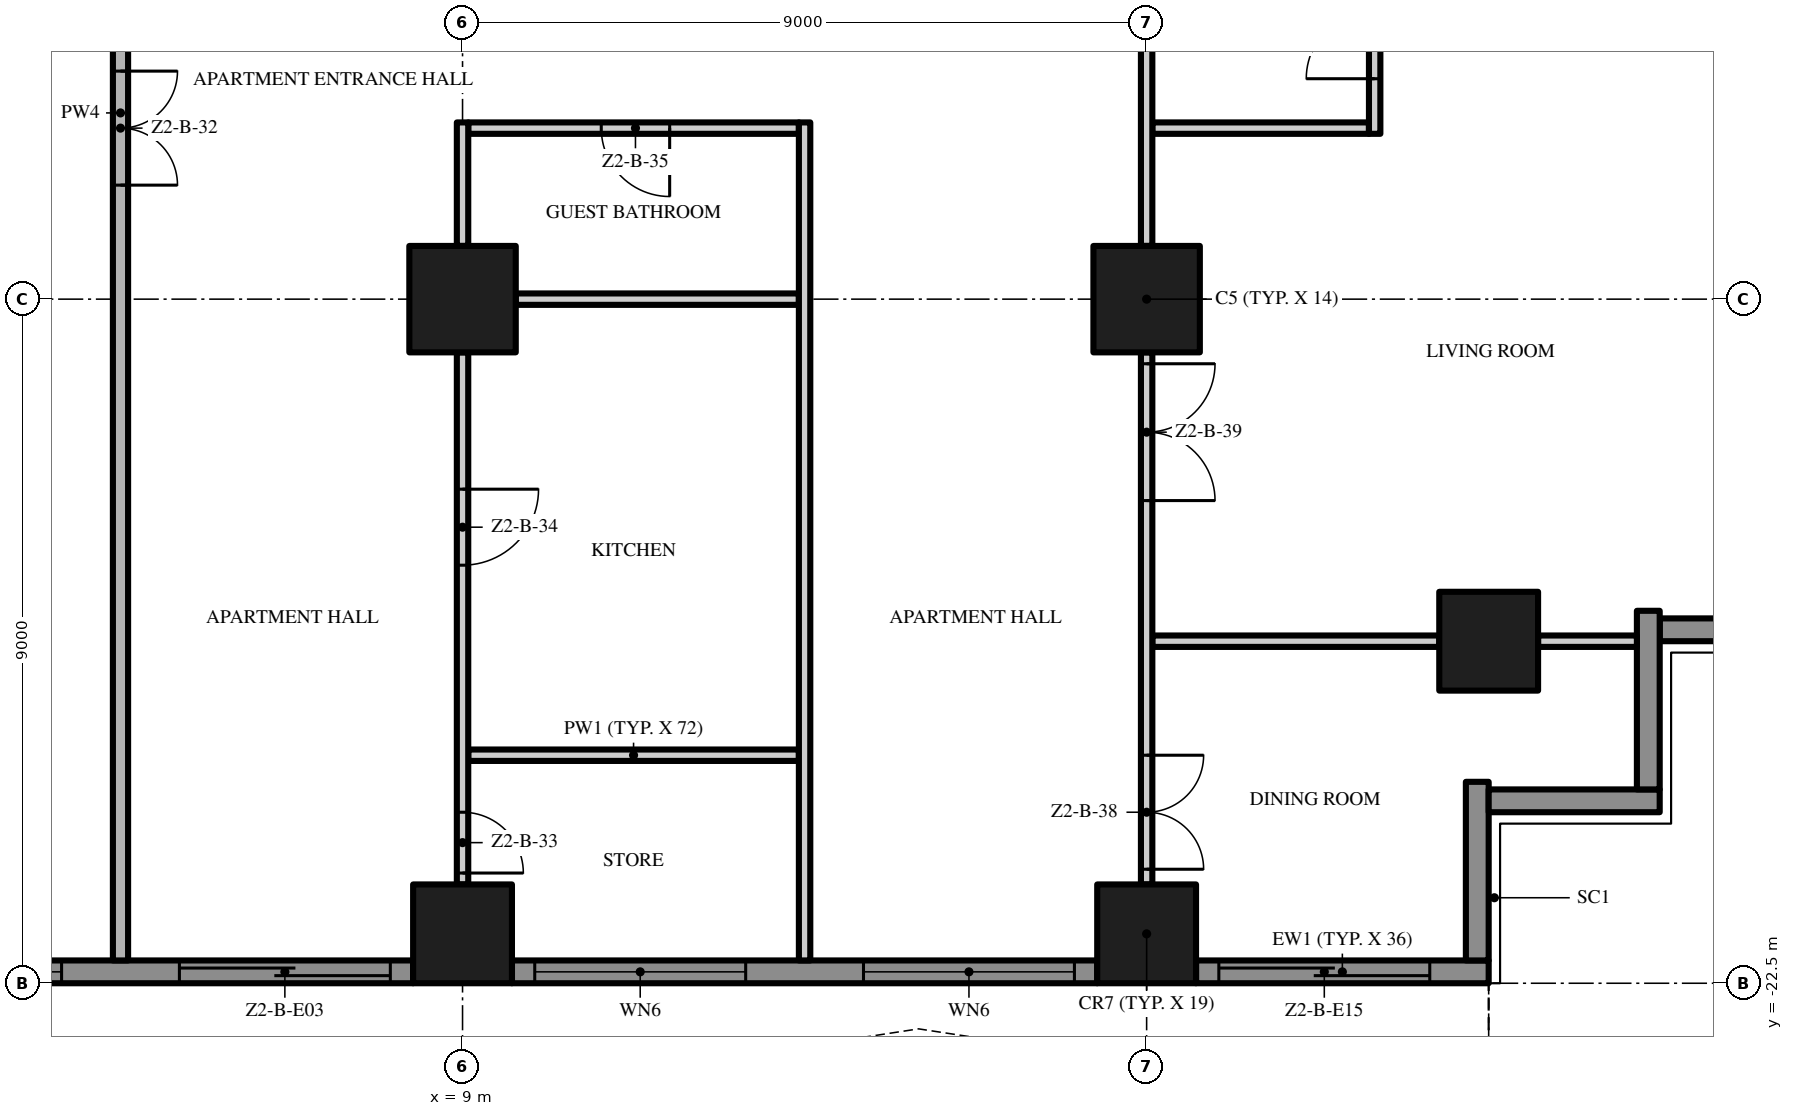
"""IFC4 building model, lengths in metres.
Left out: names, types, materials, properties, quantities, classifications, styles, units other than length and angle.
Written with IfcOpenShell. Run it as: python <this file> out.ifc"""

import sys

from ifc_helpers import new_model, si_unit, direction, frame, frame_2d, origin, origin_2d, place, context, subcontext, project, spatial, polyline, rectangle, outline, extrude, element, fill, save


model = new_model("IFC4")
c1 = context("Model", 3, precision=1e-05, world=origin(), true_north=direction((0.0, 1.0)))
c2 = subcontext(c1, "Body", "Model", "MODEL_VIEW")
j1 = project(units=[si_unit("LENGTHUNIT", "METRE"), si_unit("PLANEANGLEUNIT", "RADIAN")], contexts=[c1])
p1 = place(None, origin())
s1 = spatial("IfcSite", under=j1, at=p1, CompositionType="ELEMENT")
p2 = place(p1, origin())
s2 = spatial("IfcBuilding", under=s1, at=p2, CompositionType="ELEMENT")
p3 = place(p2, frame((0.0, 0.0, 84.6)))
s3 = spatial("IfcBuildingStorey", under=s2, at=p3, CompositionType="ELEMENT", Elevation=84.6)
p4 = place(p3, frame((18.0, -13.5, 0.0), z_axis=(0.0, 0.0, 1.0), x_axis=(1.0, 0.0, 0.0)))
e1 = element("IfcColumn", 1, at=p4, inside=s3, PredefinedType="COLUMN", context=c2, shape_type="SweptSolid", body=[
    extrude(rectangle(XDim=1.4, YDim=1.4, at=origin_2d()), origin(), (0.0, 0.0, 1.0), 3.5),
])
for number, where, z_axis, x_axis in (
    (2, (18.0, -21.85, 0.0), (0.0, 0.0, 1.0), (1.0, 0.0, 0.0)),
    (3, (22.5, -18.0, 0.0), (0.0, 0.0, 1.0), (1.0, 0.0, 0.0)),
):
    element("IfcColumn", number, at=place(p3, frame(where, z_axis=z_axis, x_axis=x_axis)), inside=s3, PredefinedType="COLUMN", context=c2, shape_type="SweptSolid", body=[
        extrude(rectangle(XDim=1.3, YDim=1.3, at=origin_2d()), origin(), (0.0, 0.0, 1.0), 3.5),
    ])
p5 = place(p3, frame((9.0, -13.5, 0.0), z_axis=(0.0, 0.0, 1.0), x_axis=(1.0, 0.0, 0.0)))
e4 = element("IfcColumn", 4, at=p5, inside=s3, PredefinedType="COLUMN", context=c2, shape_type="SweptSolid", body=[
    extrude(rectangle(XDim=1.4, YDim=1.4, at=origin_2d()), origin(), (0.0, 0.0, 1.0), 3.5),
])
p6 = place(p3, frame((9.0, -21.85, 0.0), z_axis=(0.0, 0.0, 1.0), x_axis=(1.0, 0.0, 0.0)))
e5 = element("IfcColumn", 5, at=p6, inside=s3, PredefinedType="COLUMN", context=c2, shape_type="SweptSolid", body=[
    extrude(rectangle(XDim=1.3, YDim=1.3, at=origin_2d()), origin(), (0.0, 0.0, 1.0), 3.5),
])
p7 = place(p3, frame((8.35, -22.35, 0.0), z_axis=(0.0, 0.0, 1.0), x_axis=(-1.0, 0.0, 0.0)))
e6 = element("IfcWall", 6, at=p7, inside=s3, PredefinedType="SOLIDWALL", context=c2, shape_type="SweptSolid", body=[
    extrude(rectangle(XDim=7.7, YDim=0.3, at=frame_2d((3.85, 0.0))), origin(), (0.0, 0.0, 1.0), 3.5),
])
p8 = place(p7, frame((4.625, 0.0, 0.45)))
e7 = element("IfcOpeningElement", 7, at=p8, cuts=e6, PredefinedType="OPENING", context=c2, shape_type="SweptSolid", body=[
    extrude(rectangle(XDim=2.775, YDim=2.65, at=frame_2d((1.387, 1.325))), frame((0.0, 0.16, 0.0), z_axis=(0.0, -1.0, 0.0), x_axis=(1.0, 0.0, 0.0)), (0.0, 0.0, 1.0), 0.32),
])
p9 = place(p7, frame((0.3, 0.0, 0.0)))
e8 = element("IfcOpeningElement", 8, at=p9, cuts=e6, PredefinedType="OPENING", context=c2, shape_type="SweptSolid", body=[
    extrude(rectangle(XDim=2.775, YDim=2.4, at=frame_2d((1.387, 1.2))), frame((0.0, 0.16, 0.0), z_axis=(0.0, -1.0, 0.0), x_axis=(1.0, 0.0, 0.0)), (0.0, 0.0, 1.0), 0.32),
])
p10 = place(p3, frame((17.35, -22.35, 0.0), z_axis=(0.0, 0.0, 1.0), x_axis=(-1.0, 0.0, 0.0)))
e9 = element("IfcWall", 9, at=p10, inside=s3, PredefinedType="SOLIDWALL", context=c2, shape_type="SweptSolid", body=[
    extrude(rectangle(XDim=7.7, YDim=0.3, at=frame_2d((3.85, 0.0))), origin(), (0.0, 0.0, 1.0), 3.5),
])
p11 = place(p10, frame((4.625, 0.0, 0.45)))
e10 = element("IfcOpeningElement", 10, at=p11, cuts=e9, PredefinedType="OPENING", context=c2, shape_type="SweptSolid", body=[
    extrude(rectangle(XDim=2.775, YDim=2.65, at=frame_2d((1.387, 1.325))), frame((0.0, 0.16, 0.0), z_axis=(0.0, -1.0, 0.0), x_axis=(1.0, 0.0, 0.0)), (0.0, 0.0, 1.0), 0.32),
])
p12 = place(p10, frame((0.3, 0.0, 0.45)))
e11 = element("IfcOpeningElement", 11, at=p12, cuts=e9, PredefinedType="OPENING", context=c2, shape_type="SweptSolid", body=[
    extrude(rectangle(XDim=2.775, YDim=2.65, at=frame_2d((1.387, 1.325))), frame((0.0, 0.16, 0.0), z_axis=(0.0, -1.0, 0.0), x_axis=(1.0, 0.0, 0.0)), (0.0, 0.0, 1.0), 0.32),
])
p13 = place(p3, frame((22.5, -22.35, 0.0), z_axis=(0.0, 0.0, 1.0), x_axis=(-1.0, 0.0, 0.0)))
e12 = element("IfcWall", 12, at=p13, inside=s3, PredefinedType="SOLIDWALL", context=c2, shape_type="SweptSolid", body=[
    extrude(rectangle(XDim=3.85, YDim=0.3, at=frame_2d((1.925, 0.0))), origin(), (0.0, 0.0, 1.0), 3.5),
])
p14 = place(p13, frame((0.775, 0.0, 0.0)))
e13 = element("IfcOpeningElement", 13, at=p14, cuts=e12, PredefinedType="OPENING", context=c2, shape_type="SweptSolid", body=[
    extrude(rectangle(XDim=2.775, YDim=2.4, at=frame_2d((1.387, 1.2))), frame((0.0, 0.16, 0.0), z_axis=(0.0, -1.0, 0.0), x_axis=(1.0, 0.0, 0.0)), (0.0, 0.0, 1.0), 0.32),
])
p15 = place(p3, frame((22.35, -19.85, 0.0), z_axis=(0.0, 0.0, 1.0), x_axis=(0.0, -1.0, 0.0)))
e14 = element("IfcWall", 14, at=p15, inside=s3, PredefinedType="SOLIDWALL", context=c2, shape_type="SweptSolid", body=[
    extrude(rectangle(XDim=2.35, YDim=0.3, at=frame_2d((1.175, 0.0))), origin(), (0.0, 0.0, 1.0), 3.5),
])
p16 = place(p3, frame((24.75, -20.1, 0.0), z_axis=(0.0, 0.0, 1.0), x_axis=(-1.0, 0.0, 0.0)))
e15 = element("IfcWall", 15, at=p16, inside=s3, PredefinedType="SOLIDWALL", context=c2, shape_type="SweptSolid", body=[
    extrude(rectangle(XDim=2.25, YDim=0.3, at=frame_2d((1.125, 0.0))), origin(), (0.0, 0.0, 1.0), 3.5),
])
p17 = place(p3, frame((24.6, -17.6, 0.0), z_axis=(0.0, 0.0, 1.0), x_axis=(0.0, -1.0, 0.0)))
e16 = element("IfcWall", 16, at=p17, inside=s3, PredefinedType="SOLIDWALL", context=c2, shape_type="SweptSolid", body=[
    extrude(rectangle(XDim=2.35, YDim=0.3, at=frame_2d((1.175, 0.0))), origin(), (0.0, 0.0, 1.0), 3.5),
])
p18 = place(p3, frame((27.0, -17.85, 0.0), z_axis=(0.0, 0.0, 1.0), x_axis=(-1.0, 0.0, 0.0)))
e17 = element("IfcWall", 17, at=p18, inside=s3, PredefinedType="SOLIDWALL", context=c2, shape_type="SweptSolid", body=[
    extrude(rectangle(XDim=2.25, YDim=0.3, at=frame_2d((1.125, 0.0))), origin(), (0.0, 0.0, 1.0), 3.5),
])
p19 = place(p3, origin())
e18 = element("IfcWall", 18, at=p19, inside=s3, PredefinedType="USERDEFINED", context=c2, shape_type="SweptSolid", body=[
    extrude(outline(polyline([(-22.5, -25.5), (-21.0, -25.271), (-19.5, -24.671), (-18.0, -23.929), (-16.5, -23.329), (-15.0, -23.1), (-13.5, -23.329), (-12.0, -23.929), (-10.5, -24.671), (-9.0, -25.271), (-7.5, -25.5), (-6.0, -25.271), (-4.5, -24.671), (-3.0, -23.929), (-1.5, -23.329), (0.0, -23.1), (1.5, -23.329), (3.0, -23.929), (4.5, -24.671), (6.0, -25.271), (7.5, -25.5), (9.0, -25.271), (10.5, -24.671), (12.0, -23.929), (13.5, -23.329), (15.0, -23.1), (16.5, -23.329), (18.0, -23.929), (19.5, -24.671), (21.0, -25.271), (22.5, -25.5), (22.538, -25.253), (21.066, -25.028), (19.602, -24.442), (18.102, -23.701), (16.566, -23.086), (15.0, -22.847), (13.434, -23.086), (11.898, -23.701), (10.398, -24.442), (8.934, -25.028), (7.5, -25.247), (6.066, -25.028), (4.602, -24.442), (3.102, -23.701), (1.566, -23.086), (0.0, -22.847), (-1.566, -23.086), (-3.102, -23.701), (-4.602, -24.442), (-6.066, -25.028), (-7.5, -25.247), (-8.934, -25.028), (-10.398, -24.442), (-11.898, -23.701), (-13.434, -23.086), (-15.0, -22.847), (-16.566, -23.086), (-18.102, -23.701), (-19.602, -24.442), (-21.066, -25.028), (-22.538, -25.253), (-22.5, -25.5)])), origin(), (0.0, 0.0, 1.0), 0.9),
])
p20 = place(p3, frame((9.075, -19.5, 0.0), z_axis=(0.0, 0.0, 1.0), x_axis=(1.0, 0.0, 0.0)))
e19 = element("IfcWall", 19, at=p20, inside=s3, PredefinedType="PARTITIONING", context=c2, shape_type="SweptSolid", body=[
    extrude(rectangle(XDim=4.35, YDim=0.15, at=frame_2d((2.175, 0.0))), origin(), (0.0, 0.0, 1.0), 3.5),
])
p21 = place(p3, frame((18.075, -18.0, 0.0), z_axis=(0.0, 0.0, 1.0), x_axis=(1.0, 0.0, 0.0)))
e20 = element("IfcWall", 20, at=p21, inside=s3, PredefinedType="PARTITIONING", context=c2, shape_type="SweptSolid", body=[
    extrude(rectangle(XDim=3.775, YDim=0.15, at=frame_2d((1.887, 0.0))), origin(), (0.0, 0.0, 1.0), 3.5),
])
p22 = place(p3, frame((23.15, -18.0, 0.0), z_axis=(0.0, 0.0, 1.0), x_axis=(1.0, 0.0, 0.0)))
e21 = element("IfcWall", 21, at=p22, inside=s3, PredefinedType="PARTITIONING", context=c2, shape_type="SweptSolid", body=[
    extrude(rectangle(XDim=1.3, YDim=0.15, at=frame_2d((0.65, 0.0))), origin(), (0.0, 0.0, 1.0), 3.5),
])
p23 = place(p3, frame((9.7, -13.5, 0.0), z_axis=(0.0, 0.0, 1.0), x_axis=(1.0, 0.0, 0.0)))
e22 = element("IfcWall", 22, at=p23, inside=s3, PredefinedType="PARTITIONING", context=c2, shape_type="SweptSolid", body=[
    extrude(rectangle(XDim=3.725, YDim=0.15, at=frame_2d((1.863, 0.0))), origin(), (0.0, 0.0, 1.0), 3.5),
])
p24 = place(p3, frame((13.425, -11.25, 0.0), z_axis=(0.0, 0.0, 1.0), x_axis=(-1.0, 0.0, 0.0)))
e23 = element("IfcWall", 23, at=p24, inside=s3, PredefinedType="PARTITIONING", context=c2, shape_type="SweptSolid", body=[
    extrude(rectangle(XDim=4.35, YDim=0.15, at=frame_2d((2.175, 0.0))), origin(), (0.0, 0.0, 1.0), 3.5),
])
p25 = place(p24, frame((1.7, 0.0, 0.0)))
e24 = element("IfcOpeningElement", 24, at=p25, cuts=e23, PredefinedType="OPENING", context=c2, shape_type="SweptSolid", body=[
    extrude(rectangle(XDim=0.9, YDim=2.1, at=frame_2d((0.45, 1.05))), frame((0.0, 0.085, 0.0), z_axis=(0.0, -1.0, 0.0), x_axis=(1.0, 0.0, 0.0)), (0.0, 0.0, 1.0), 0.17),
])
p26 = place(p3, frame((18.075, -11.25, 0.0), z_axis=(0.0, 0.0, 1.0), x_axis=(1.0, 0.0, 0.0)))
e25 = element("IfcWall", 25, at=p26, inside=s3, PredefinedType="PARTITIONING", context=c2, shape_type="SweptSolid", body=[
    extrude(rectangle(XDim=2.85, YDim=0.15, at=frame_2d((1.425, 0.0))), origin(), (0.0, 0.0, 1.0), 3.5),
])
p27 = place(p3, frame((4.5, 0.1, 0.0), z_axis=(0.0, 0.0, 1.0), x_axis=(0.0, -1.0, 0.0)))
e26 = element("IfcWall", 26, at=p27, inside=s3, PredefinedType="PARTITIONING", context=c2, shape_type="SweptSolid", body=[
    extrude(rectangle(XDim=22.3, YDim=0.2, at=frame_2d((11.15, 0.0))), origin(), (0.0, 0.0, 1.0), 3.5),
])
p28 = place(p27, frame((10.6, 0.0, 0.0)))
e27 = element("IfcOpeningElement", 27, at=p28, cuts=e26, PredefinedType="OPENING", context=c2, shape_type="SweptSolid", body=[
    extrude(rectangle(XDim=1.5, YDim=2.4, at=frame_2d((0.75, 1.2))), frame((0.0, 0.11, 0.0), z_axis=(0.0, -1.0, 0.0), x_axis=(1.0, 0.0, 0.0)), (0.0, 0.0, 1.0), 0.22),
])
p29 = place(p3, frame((9.0, -14.2, 0.0), z_axis=(0.0, 0.0, 1.0), x_axis=(0.0, -1.0, 0.0)))
e28 = element("IfcWall", 28, at=p29, inside=s3, PredefinedType="PARTITIONING", context=c2, shape_type="SweptSolid", body=[
    extrude(rectangle(XDim=7.0, YDim=0.15, at=frame_2d((3.5, 0.0))), origin(), (0.0, 0.0, 1.0), 3.5),
])
p30 = place(p29, frame((6.05, 0.0, 0.0)))
e29 = element("IfcOpeningElement", 29, at=p30, cuts=e28, PredefinedType="OPENING", context=c2, shape_type="SweptSolid", body=[
    extrude(rectangle(XDim=0.8, YDim=2.0, at=frame_2d((0.4, 1.0))), frame((0.0, 0.085, 0.0), z_axis=(0.0, -1.0, 0.0), x_axis=(1.0, 0.0, 0.0)), (0.0, 0.0, 1.0), 0.17),
])
p31 = place(p29, frame((1.8, 0.0, 0.0)))
e30 = element("IfcOpeningElement", 30, at=p31, cuts=e28, PredefinedType="OPENING", context=c2, shape_type="SweptSolid", body=[
    extrude(rectangle(XDim=1.0, YDim=2.4, at=frame_2d((0.5, 1.2))), frame((0.0, 0.085, 0.0), z_axis=(0.0, -1.0, 0.0), x_axis=(1.0, 0.0, 0.0)), (0.0, 0.0, 1.0), 0.17),
])
p32 = place(p3, frame((9.0, -12.8, 0.0), z_axis=(0.0, 0.0, 1.0), x_axis=(0.0, 1.0, 0.0)))
e31 = element("IfcWall", 31, at=p32, inside=s3, PredefinedType="PARTITIONING", context=c2, shape_type="SweptSolid", body=[
    extrude(rectangle(XDim=1.625, YDim=0.15, at=frame_2d((0.812, 0.0))), origin(), (0.0, 0.0, 1.0), 3.5),
])
p33 = place(p3, frame((13.5, -22.2, 0.0), z_axis=(0.0, 0.0, 1.0), x_axis=(0.0, 1.0, 0.0)))
e32 = element("IfcWall", 32, at=p33, inside=s3, PredefinedType="PARTITIONING", context=c2, shape_type="SweptSolid", body=[
    extrude(rectangle(XDim=11.025, YDim=0.15, at=frame_2d((5.513, 0.0))), origin(), (0.0, 0.0, 1.0), 3.5),
])
p34 = place(p3, frame((18.0, -14.2, 0.0), z_axis=(0.0, 0.0, 1.0), x_axis=(0.0, -1.0, 0.0)))
e33 = element("IfcWall", 33, at=p34, inside=s3, PredefinedType="PARTITIONING", context=c2, shape_type="SweptSolid", body=[
    extrude(rectangle(XDim=7.0, YDim=0.15, at=frame_2d((3.5, 0.0))), origin(), (0.0, 0.0, 1.0), 3.5),
])
p35 = place(p34, frame((5.3, 0.0, 0.0)))
e34 = element("IfcOpeningElement", 34, at=p35, cuts=e33, PredefinedType="OPENING", context=c2, shape_type="SweptSolid", body=[
    extrude(rectangle(XDim=1.5, YDim=2.4, at=frame_2d((0.75, 1.2))), frame((0.0, 0.085, 0.0), z_axis=(0.0, -1.0, 0.0), x_axis=(1.0, 0.0, 0.0)), (0.0, 0.0, 1.0), 0.17),
])
p36 = place(p34, frame((0.15, 0.0, 0.0)))
e35 = element("IfcOpeningElement", 35, at=p36, cuts=e33, PredefinedType="OPENING", context=c2, shape_type="SweptSolid", body=[
    extrude(rectangle(XDim=1.8, YDim=2.4, at=frame_2d((0.9, 1.2))), frame((0.0, 0.085, 0.0), z_axis=(0.0, -1.0, 0.0), x_axis=(1.0, 0.0, 0.0)), (0.0, 0.0, 1.0), 0.17),
])
p37 = place(p3, frame((18.0, -5.2, 0.0), z_axis=(0.0, 0.0, 1.0), x_axis=(0.0, -1.0, 0.0)))
e36 = element("IfcWall", 36, at=p37, inside=s3, PredefinedType="PARTITIONING", context=c2, shape_type="SweptSolid", body=[
    extrude(rectangle(XDim=7.6, YDim=0.15, at=frame_2d((3.8, 0.0))), origin(), (0.0, 0.0, 1.0), 3.5),
])
p38 = place(p37, frame((0.15, 0.0, 0.0)))
e37 = element("IfcOpeningElement", 37, at=p38, cuts=e36, PredefinedType="OPENING", context=c2, shape_type="SweptSolid", body=[
    extrude(rectangle(XDim=1.0, YDim=2.4, at=frame_2d((0.5, 1.2))), frame((0.0, 0.085, 0.0), z_axis=(0.0, -1.0, 0.0), x_axis=(1.0, 0.0, 0.0)), (0.0, 0.0, 1.0), 0.17),
])
p39 = place(p3, frame((21.0, -11.325, 0.0), z_axis=(0.0, 0.0, 1.0), x_axis=(0.0, 1.0, 0.0)))
e38 = element("IfcWall", 38, at=p39, inside=s3, PredefinedType="PARTITIONING", context=c2, shape_type="SweptSolid", body=[
    extrude(rectangle(XDim=4.65, YDim=0.15, at=frame_2d((2.325, 0.0))), origin(), (0.0, 0.0, 1.0), 3.5),
])
p40 = place(p39, frame((0.725, 0.0, 0.0)))
e39 = element("IfcOpeningElement", 39, at=p40, cuts=e38, PredefinedType="OPENING", context=c2, shape_type="SweptSolid", body=[
    extrude(rectangle(XDim=0.9, YDim=2.1, at=frame_2d((0.45, 1.05))), frame((0.0, 0.085, 0.0), z_axis=(0.0, -1.0, 0.0), x_axis=(1.0, 0.0, 0.0)), (0.0, 0.0, 1.0), 0.17),
])
p41 = place(p39, frame((3.025, 0.0, 0.0)))
e40 = element("IfcOpeningElement", 40, at=p41, cuts=e38, PredefinedType="OPENING", context=c2, shape_type="SweptSolid", body=[
    extrude(rectangle(XDim=0.9, YDim=2.1, at=frame_2d((0.45, 1.05))), frame((0.0, 0.085, 0.0), z_axis=(0.0, -1.0, 0.0), x_axis=(1.0, 0.0, 0.0)), (0.0, 0.0, 1.0), 0.17),
])
p42 = place(p8, origin())
e41 = element("IfcWindow", 41, at=p42, inside=s3, PartitioningType="SINGLE_PANEL", PredefinedType="WINDOW", context=c2, shape_type="SweptSolid", body=[
    extrude(rectangle(XDim=2.775, YDim=2.65, at=frame_2d((1.387, 1.325))), frame((0.0, 0.03, 0.0), z_axis=(0.0, -1.0, 0.0), x_axis=(1.0, 0.0, 0.0)), (0.0, 0.0, 1.0), 0.06),
])
fill(e7, e41)
p43 = place(p9, origin())
e42 = element("IfcDoor", 42, at=p43, inside=s3, OperationType="SINGLE_SWING_LEFT", PredefinedType="DOOR", context=c2, shape_type="SweptSolid", body=[
    extrude(rectangle(XDim=2.775, YDim=2.4, at=frame_2d((1.387, 1.2))), frame((0.0, 0.025, 0.0), z_axis=(0.0, -1.0, 0.0), x_axis=(1.0, 0.0, 0.0)), (0.0, 0.0, 1.0), 0.05),
])
fill(e8, e42)
p44 = place(p11, origin())
e43 = element("IfcWindow", 43, at=p44, inside=s3, PartitioningType="SINGLE_PANEL", PredefinedType="WINDOW", context=c2, shape_type="SweptSolid", body=[
    extrude(rectangle(XDim=2.775, YDim=2.65, at=frame_2d((1.387, 1.325))), frame((0.0, 0.03, 0.0), z_axis=(0.0, -1.0, 0.0), x_axis=(1.0, 0.0, 0.0)), (0.0, 0.0, 1.0), 0.06),
])
fill(e10, e43)
p45 = place(p12, origin())
e44 = element("IfcWindow", 44, at=p45, inside=s3, PartitioningType="SINGLE_PANEL", PredefinedType="WINDOW", context=c2, shape_type="SweptSolid", body=[
    extrude(rectangle(XDim=2.775, YDim=2.65, at=frame_2d((1.387, 1.325))), frame((0.0, 0.03, 0.0), z_axis=(0.0, -1.0, 0.0), x_axis=(1.0, 0.0, 0.0)), (0.0, 0.0, 1.0), 0.06),
])
fill(e11, e44)
p46 = place(p14, origin())
e45 = element("IfcDoor", 45, at=p46, inside=s3, OperationType="SINGLE_SWING_LEFT", PredefinedType="DOOR", context=c2, shape_type="SweptSolid", body=[
    extrude(rectangle(XDim=2.775, YDim=2.4, at=frame_2d((1.387, 1.2))), frame((0.0, 0.025, 0.0), z_axis=(0.0, -1.0, 0.0), x_axis=(1.0, 0.0, 0.0)), (0.0, 0.0, 1.0), 0.05),
])
fill(e13, e45)
p47 = place(p28, origin())
e46 = element("IfcDoor", 46, at=p47, inside=s3, OperationType="DOUBLE_DOOR_SINGLE_SWING", PredefinedType="DOOR", context=c2, shape_type="SweptSolid", body=[
    extrude(rectangle(XDim=1.5, YDim=2.4, at=frame_2d((0.75, 1.2))), frame((0.0, 0.025, 0.0), z_axis=(0.0, -1.0, 0.0), x_axis=(1.0, 0.0, 0.0)), (0.0, 0.0, 1.0), 0.05),
])
fill(e27, e46)
p48 = place(p30, origin())
e47 = element("IfcDoor", 47, at=p48, inside=s3, OperationType="SINGLE_SWING_RIGHT", PredefinedType="DOOR", context=c2, shape_type="SweptSolid", body=[
    extrude(rectangle(XDim=0.8, YDim=2.0, at=frame_2d((0.4, 1.0))), frame((0.0, 0.025, 0.0), z_axis=(0.0, -1.0, 0.0), x_axis=(1.0, 0.0, 0.0)), (0.0, 0.0, 1.0), 0.05),
])
fill(e29, e47)
p49 = place(p31, origin())
e48 = element("IfcDoor", 48, at=p49, inside=s3, OperationType="SINGLE_SWING_LEFT", PredefinedType="DOOR", context=c2, shape_type="SweptSolid", body=[
    extrude(rectangle(XDim=1.0, YDim=2.4, at=frame_2d((0.5, 1.2))), frame((0.0, 0.025, 0.0), z_axis=(0.0, -1.0, 0.0), x_axis=(1.0, 0.0, 0.0)), (0.0, 0.0, 1.0), 0.05),
])
fill(e30, e48)
p50 = place(p25, origin())
e49 = element("IfcDoor", 49, at=p50, inside=s3, OperationType="SINGLE_SWING_LEFT", PredefinedType="DOOR", context=c2, shape_type="SweptSolid", body=[
    extrude(rectangle(XDim=0.9, YDim=2.1, at=frame_2d((0.45, 1.05))), frame((0.0, 0.025, 0.0), z_axis=(0.0, -1.0, 0.0), x_axis=(1.0, 0.0, 0.0)), (0.0, 0.0, 1.0), 0.05),
])
fill(e24, e49)
p51 = place(p35, origin())
e50 = element("IfcDoor", 50, at=p51, inside=s3, OperationType="DOUBLE_DOOR_SINGLE_SWING", PredefinedType="DOOR", context=c2, shape_type="SweptSolid", body=[
    extrude(rectangle(XDim=1.5, YDim=2.4, at=frame_2d((0.75, 1.2))), frame((0.0, 0.025, 0.0), z_axis=(0.0, -1.0, 0.0), x_axis=(1.0, 0.0, 0.0)), (0.0, 0.0, 1.0), 0.05),
])
fill(e34, e50)
p52 = place(p36, origin())
e51 = element("IfcDoor", 51, at=p52, inside=s3, OperationType="DOUBLE_DOOR_SINGLE_SWING", PredefinedType="DOOR", context=c2, shape_type="SweptSolid", body=[
    extrude(rectangle(XDim=1.8, YDim=2.4, at=frame_2d((0.9, 1.2))), frame((0.0, 0.025, 0.0), z_axis=(0.0, -1.0, 0.0), x_axis=(1.0, 0.0, 0.0)), (0.0, 0.0, 1.0), 0.05),
])
fill(e35, e51)
p53 = place(p40, origin())
e52 = element("IfcDoor", 52, at=p53, inside=s3, OperationType="SINGLE_SWING_LEFT", PredefinedType="DOOR", context=c2, shape_type="SweptSolid", body=[
    extrude(rectangle(XDim=0.9, YDim=2.1, at=frame_2d((0.45, 1.05))), frame((0.0, 0.025, 0.0), z_axis=(0.0, -1.0, 0.0), x_axis=(1.0, 0.0, 0.0)), (0.0, 0.0, 1.0), 0.05),
])
fill(e39, e52)
save(model, sys.argv[1])
